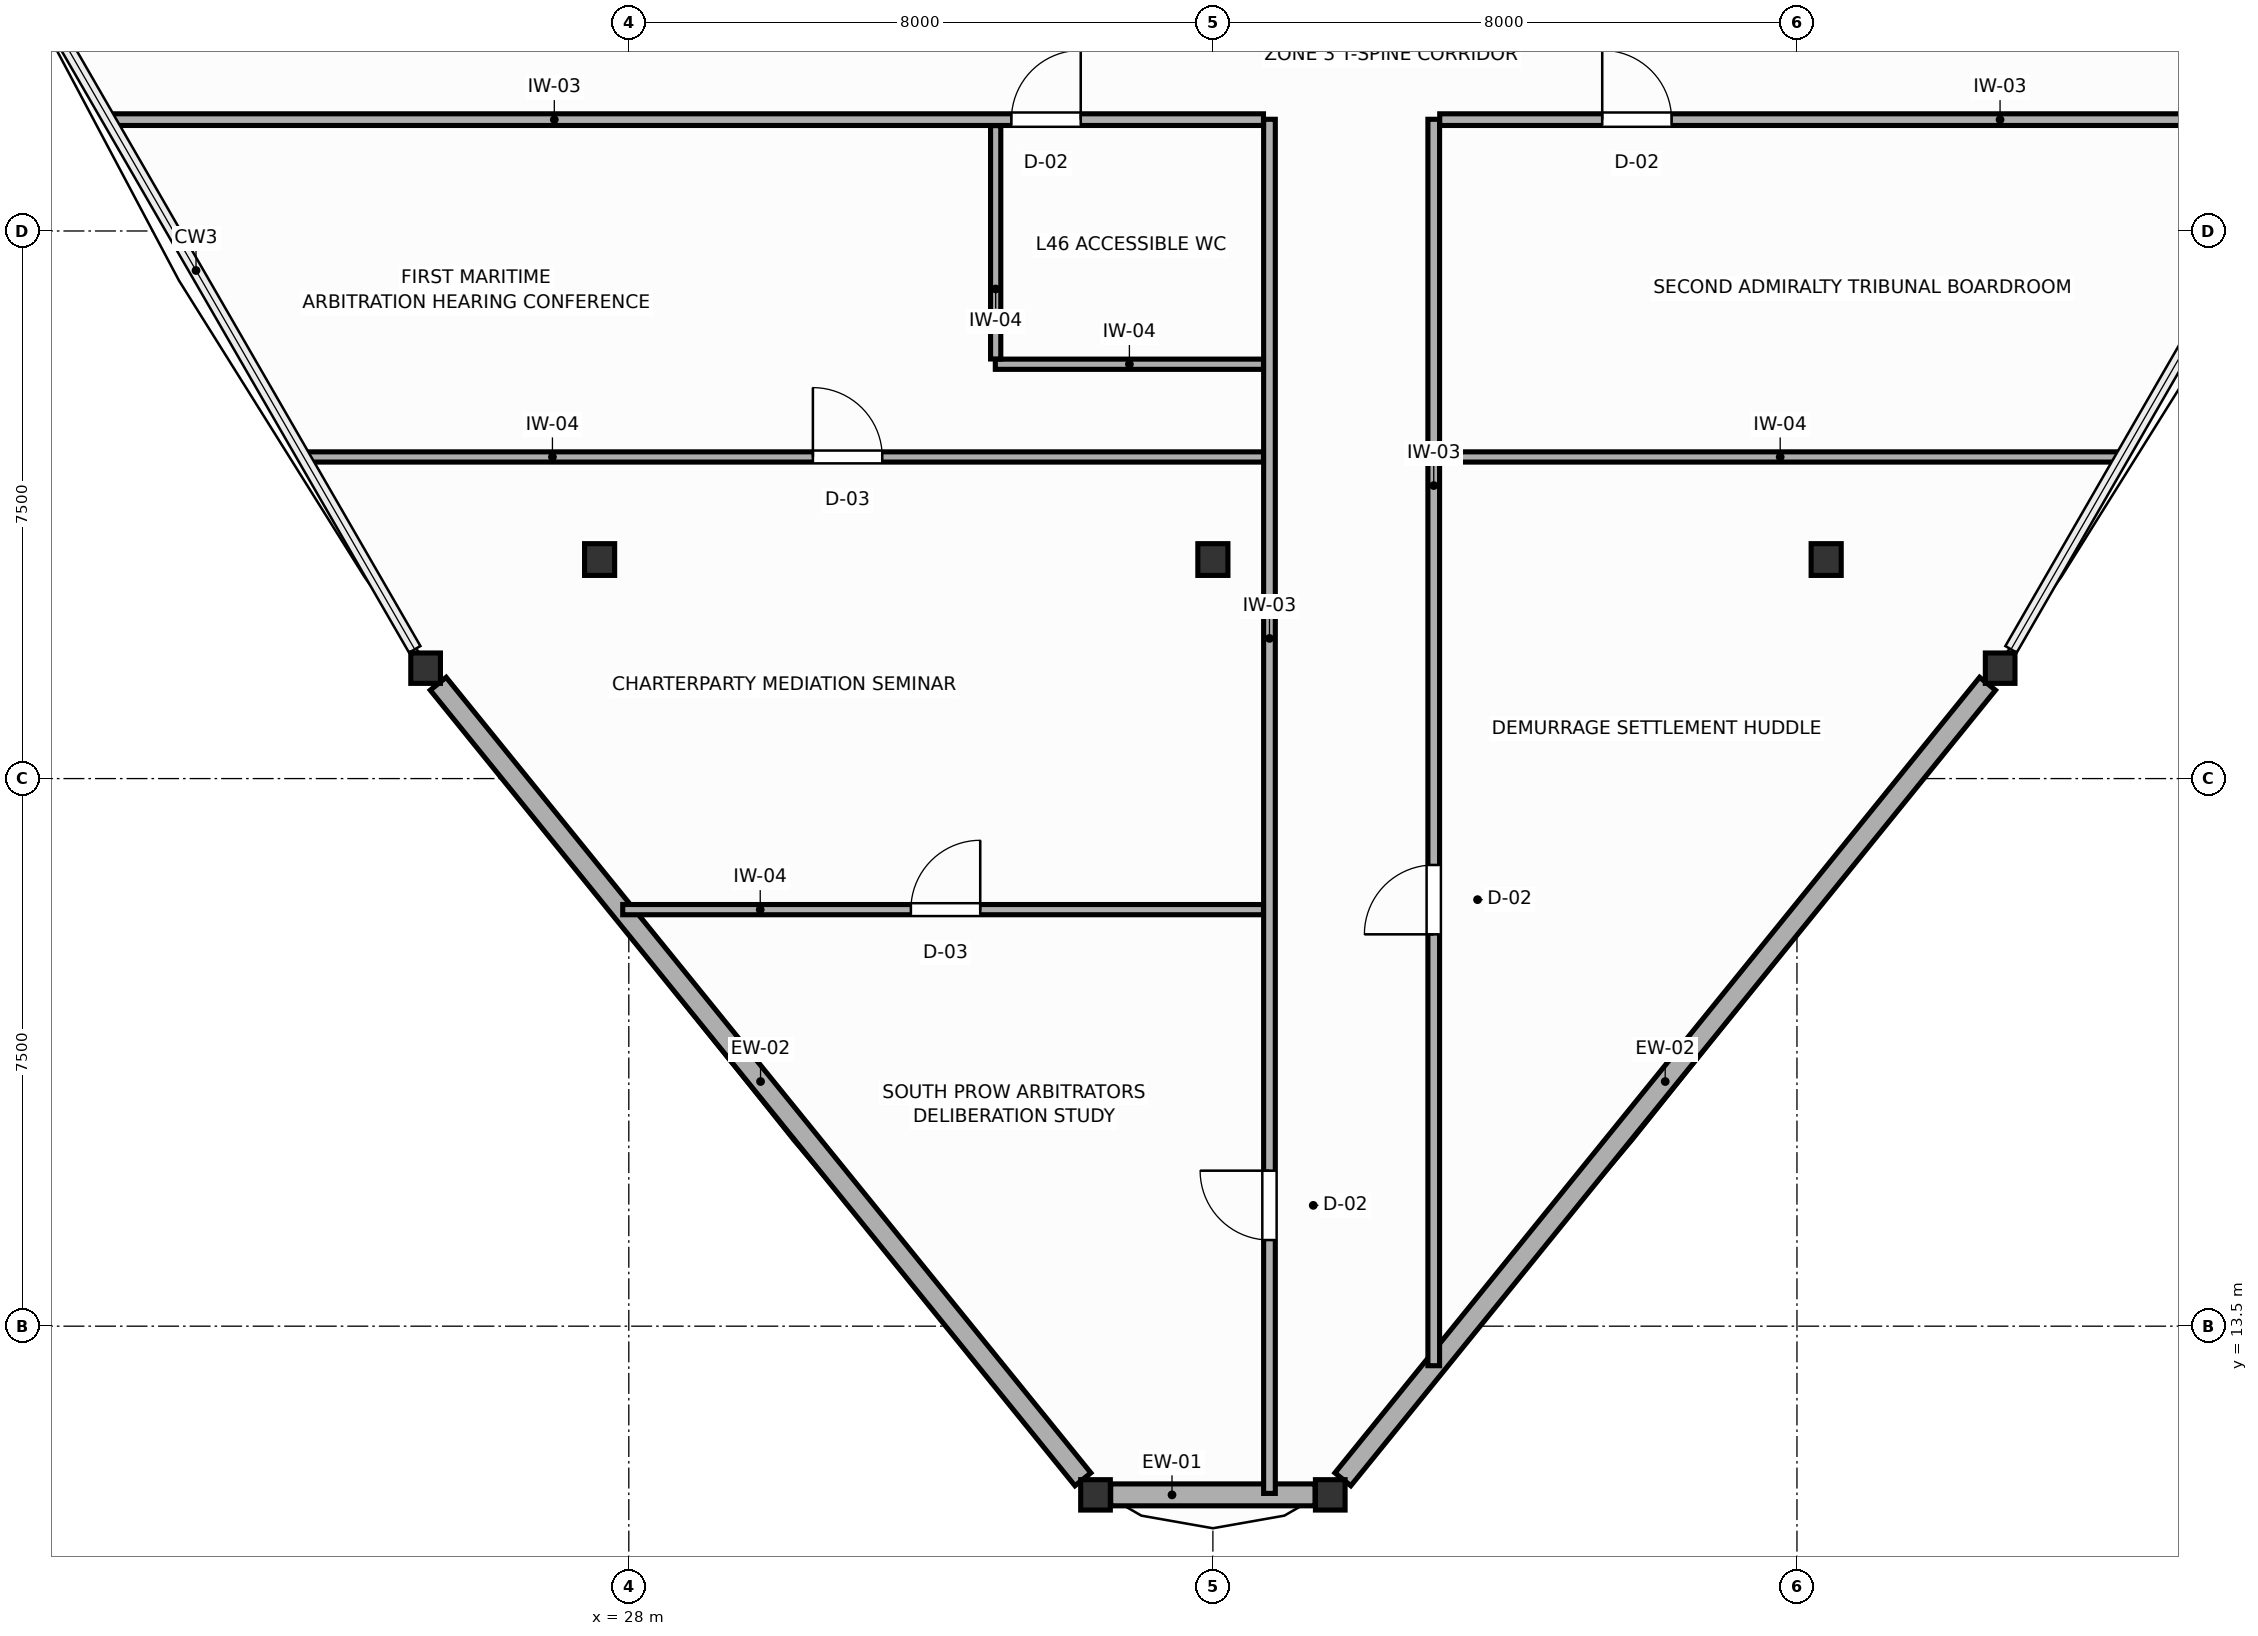
"""IFC4 building model, lengths in metres.
Left out: names, types, materials, properties, quantities, classifications, styles, units other than length and angle.
Written with IfcOpenShell. Run it as: python <this file> out.ifc"""

import sys

from ifc_helpers import new_model, si_unit, direction, frame, frame_2d, origin, origin_2d, place, context, subcontext, project, spatial, rectangle, i_section, extrude, source, transform, mapped, element, fill, save


model = new_model("IFC4")
c1 = context("Model", 3, precision=1e-05, world=origin(), true_north=direction((0.0, 1.0)))
c2 = subcontext(c1, "Body", "Model", "MODEL_VIEW")
j1 = project(units=[si_unit("LENGTHUNIT", "METRE"), si_unit("PLANEANGLEUNIT", "RADIAN")], contexts=[c1])
p1 = place(None, origin())
s1 = spatial("IfcSite", under=j1, at=p1, CompositionType="ELEMENT")
p2 = place(p1, origin())
s2 = spatial("IfcBuilding", under=s1, at=p2, CompositionType="ELEMENT")
p3 = place(p2, frame((0.0, 0.0, 179.4)))
s3 = spatial("IfcBuildingStorey", under=s2, at=p3, CompositionType="ELEMENT", Elevation=179.4)
m1 = source(origin(), c2, "Body", "SweptSolid", [
    extrude(i_section(OverallWidth=0.412, OverallDepth=0.435, WebThickness=0.033, FlangeThickness=0.053, FilletRadius=0.015, at=origin_2d()), origin(), (0.0, 0.0, 1.0), 3.6),
])
for number, where, z_axis, x_axis in (
    (1, (27.6, 24.0, 0.0), (0.0, 0.0, 1.0), (1.0, 0.0, 0.0)),
    (2, (44.4, 24.0, 0.0), (0.0, 0.0, 1.0), (1.0, 0.0, 0.0)),
    (3, (36.0, 24.0, 0.0), (0.0, 0.0, 1.0), (1.0, 0.0, 0.0)),
):
    element("IfcColumn", number, at=place(p3, frame(where, z_axis=z_axis, x_axis=x_axis)), inside=s3, PredefinedType="COLUMN", context=c2, shape_type="MappedRepresentation", body=[
        mapped(m1, transform((0.0, 0.0, 0.0), scale=1.0)),
    ])
m2 = source(origin(), c2, "Body", "SweptSolid", [
    extrude(i_section(OverallWidth=0.406, OverallDepth=0.416, WebThickness=0.027, FlangeThickness=0.044, FilletRadius=0.015, at=origin_2d()), origin(), (0.0, 0.0, 1.0), 3.6),
])
for number, where, z_axis, x_axis in (
    (4, (25.217, 22.512, 0.0), (0.0, 0.0, 1.0), (1.0, 0.0, 0.0)),
    (5, (34.392, 11.189, 0.0), (0.0, 0.0, 1.0), (1.0, 0.0, 0.0)),
    (6, (37.608, 11.189, 0.0), (0.0, 0.0, 1.0), (1.0, 0.0, 0.0)),
    (7, (46.783, 22.512, 0.0), (0.0, 0.0, 1.0), (1.0, 0.0, 0.0)),
):
    element("IfcColumn", number, at=place(p3, frame(where, z_axis=z_axis, x_axis=x_axis)), inside=s3, PredefinedType="COLUMN", context=c2, shape_type="MappedRepresentation", body=[
        mapped(m2, transform((0.0, 0.0, 0.0), scale=1.0)),
    ])
p4 = place(p3, frame((25.389, 22.299, 0.0), z_axis=(0.0, 0.0, 1.0), x_axis=(0.629601252026, -0.776918440666, 0.0)))
e8 = element("IfcWall", 8, at=p4, inside=s3, PredefinedType="SOLIDWALL", context=c2, shape_type="SweptSolid", body=[
    extrude(rectangle(XDim=14.025, YDim=0.28, at=frame_2d((7.013, 0.0))), origin(), (0.0, 0.0, 1.0), 1.87),
])
p5 = place(p3, frame((34.6, 11.189, 0.0), z_axis=(0.0, 0.0, 1.0), x_axis=(1.0, 0.0, 0.0)))
e9 = element("IfcWall", 9, at=p5, inside=s3, PredefinedType="SOLIDWALL", context=c2, shape_type="SweptSolid", body=[
    extrude(rectangle(XDim=2.799, YDim=0.3, at=frame_2d((1.4, 0.0))), origin(), (0.0, 0.0, 1.0), 1.87),
])
p6 = place(p3, frame((37.78, 11.403, 0.0), z_axis=(0.0, 0.0, 1.0), x_axis=(0.629601252026, 0.776918440666, 0.0)))
e10 = element("IfcWall", 10, at=p6, inside=s3, PredefinedType="SOLIDWALL", context=c2, shape_type="SweptSolid", body=[
    extrude(rectangle(XDim=14.025, YDim=0.28, at=frame_2d((7.013, 0.0))), origin(), (0.0, 0.0, 1.0), 1.87),
])
p7 = place(p3, frame((36.775, 11.209, 0.0), z_axis=(0.0, 0.0, 1.0), x_axis=(0.0, 1.0, 0.0)))
e11 = element("IfcWall", 11, at=p7, inside=s3, PredefinedType="PARTITIONING", context=c2, shape_type="SweptSolid", body=[
    extrude(rectangle(XDim=18.821, YDim=0.16, at=frame_2d((9.41, 0.0))), origin(), (0.0, 0.0, 1.0), 3.4),
])
p8 = place(p7, frame((3.47, 0.0, 0.0)))
e12 = element("IfcOpeningElement", 12, at=p8, cuts=e11, PredefinedType="OPENING", context=c2, shape_type="SweptSolid", body=[
    extrude(rectangle(XDim=0.95, YDim=2.05, at=frame_2d((0.475, 1.025))), frame((0.0, 0.09, 0.0), z_axis=(0.0, -1.0, 0.0), x_axis=(1.0, 0.0, 0.0)), (0.0, 0.0, 1.0), 0.18),
])
p9 = place(p3, frame((39.025, 12.958, 0.0), z_axis=(0.0, 0.0, 1.0), x_axis=(0.0, 1.0, 0.0)))
e13 = element("IfcWall", 13, at=p9, inside=s3, PredefinedType="PARTITIONING", context=c2, shape_type="SweptSolid", body=[
    extrude(rectangle(XDim=17.072, YDim=0.16, at=frame_2d((8.536, 0.0))), origin(), (0.0, 0.0, 1.0), 3.4),
])
p10 = place(p9, frame((5.908, 0.0, 0.0)))
e14 = element("IfcOpeningElement", 14, at=p10, cuts=e13, PredefinedType="OPENING", context=c2, shape_type="SweptSolid", body=[
    extrude(rectangle(XDim=0.95, YDim=2.05, at=frame_2d((0.475, 1.025))), frame((0.0, 0.09, 0.0), z_axis=(0.0, -1.0, 0.0), x_axis=(1.0, 0.0, 0.0)), (0.0, 0.0, 1.0), 0.18),
])
p11 = place(p3, frame((20.899, 30.025, 0.0), z_axis=(0.0, 0.0, 1.0), x_axis=(1.0, 0.0, 0.0)))
e15 = element("IfcWall", 15, at=p11, inside=s3, PredefinedType="PARTITIONING", context=c2, shape_type="SweptSolid", body=[
    extrude(rectangle(XDim=15.794, YDim=0.16, at=frame_2d((7.897, 0.0))), origin(), (0.0, 0.0, 1.0), 3.4),
])
p12 = place(p11, frame((12.341, 0.0, 0.0)))
e16 = element("IfcOpeningElement", 16, at=p12, cuts=e15, PredefinedType="OPENING", context=c2, shape_type="SweptSolid", body=[
    extrude(rectangle(XDim=0.95, YDim=2.05, at=frame_2d((0.475, 1.025))), frame((0.0, 0.09, 0.0), z_axis=(0.0, -1.0, 0.0), x_axis=(1.0, 0.0, 0.0)), (0.0, 0.0, 1.0), 0.18),
])
p13 = place(p3, frame((39.107, 30.025, 0.0), z_axis=(0.0, 0.0, 1.0), x_axis=(1.0, 0.0, 0.0)))
e17 = element("IfcWall", 17, at=p13, inside=s3, PredefinedType="PARTITIONING", context=c2, shape_type="SweptSolid", body=[
    extrude(rectangle(XDim=11.994, YDim=0.16, at=frame_2d((5.997, 0.0))), origin(), (0.0, 0.0, 1.0), 3.4),
])
p14 = place(p13, frame((2.226, 0.0, 0.0)))
e18 = element("IfcOpeningElement", 18, at=p14, cuts=e17, PredefinedType="OPENING", context=c2, shape_type="SweptSolid", body=[
    extrude(rectangle(XDim=0.95, YDim=2.05, at=frame_2d((0.475, 1.025))), frame((0.0, 0.09, 0.0), z_axis=(0.0, -1.0, 0.0), x_axis=(1.0, 0.0, 0.0)), (0.0, 0.0, 1.0), 0.18),
])
p15 = place(p3, frame((23.567, 25.405, 0.0), z_axis=(0.0, 0.0, 1.0), x_axis=(1.0, 0.0, 0.0)))
e19 = element("IfcWall", 19, at=p15, inside=s3, PredefinedType="PARTITIONING", context=c2, shape_type="SweptSolid", body=[
    extrude(rectangle(XDim=13.126, YDim=0.14, at=frame_2d((6.563, 0.0))), origin(), (0.0, 0.0, 1.0), 3.4),
])
p16 = place(p15, frame((6.955, 0.0, 0.0)))
e20 = element("IfcOpeningElement", 20, at=p16, cuts=e19, PredefinedType="OPENING", context=c2, shape_type="SweptSolid", body=[
    extrude(rectangle(XDim=0.95, YDim=2.05, at=frame_2d((0.475, 1.025))), frame((0.0, 0.08, 0.0), z_axis=(0.0, -1.0, 0.0), x_axis=(1.0, 0.0, 0.0)), (0.0, 0.0, 1.0), 0.16),
])
p17 = place(p3, frame((39.107, 25.405, 0.0), z_axis=(0.0, 0.0, 1.0), x_axis=(1.0, 0.0, 0.0)))
e21 = element("IfcWall", 21, at=p17, inside=s3, PredefinedType="PARTITIONING", context=c2, shape_type="SweptSolid", body=[
    extrude(rectangle(XDim=9.326, YDim=0.14, at=frame_2d((4.663, 0.0))), origin(), (0.0, 0.0, 1.0), 3.4),
])
p18 = place(p3, frame((27.917, 19.205, 0.0), z_axis=(0.0, 0.0, 1.0), x_axis=(1.0, 0.0, 0.0)))
e22 = element("IfcWall", 22, at=p18, inside=s3, PredefinedType="PARTITIONING", context=c2, shape_type="SweptSolid", body=[
    extrude(rectangle(XDim=8.776, YDim=0.14, at=frame_2d((4.388, 0.0))), origin(), (0.0, 0.0, 1.0), 3.4),
])
p19 = place(p18, frame((3.947, 0.0, 0.0)))
e23 = element("IfcOpeningElement", 23, at=p19, cuts=e22, PredefinedType="OPENING", context=c2, shape_type="SweptSolid", body=[
    extrude(rectangle(XDim=0.95, YDim=2.05, at=frame_2d((0.475, 1.025))), frame((0.0, 0.08, 0.0), z_axis=(0.0, -1.0, 0.0), x_axis=(1.0, 0.0, 0.0)), (0.0, 0.0, 1.0), 0.16),
])
p20 = place(p3, frame((33.02, 26.675, 0.0), z_axis=(0.0, 0.0, 1.0), x_axis=(1.0, 0.0, 0.0)))
e24 = element("IfcWall", 24, at=p20, inside=s3, PredefinedType="PARTITIONING", context=c2, shape_type="SweptSolid", body=[
    extrude(rectangle(XDim=3.673, YDim=0.14, at=frame_2d((1.836, 0.0))), origin(), (0.0, 0.0, 1.0), 3.4),
])
p21 = place(p3, frame((33.025, 26.747, 0.0), z_axis=(0.0, 0.0, 1.0), x_axis=(0.0, 1.0, 0.0)))
e25 = element("IfcWall", 25, at=p21, inside=s3, PredefinedType="PARTITIONING", context=c2, shape_type="SweptSolid", body=[
    extrude(rectangle(XDim=3.196, YDim=0.14, at=frame_2d((1.598, 0.0))), origin(), (0.0, 0.0, 1.0), 3.4),
])
p22 = place(p8, origin())
e26 = element("IfcDoor", 26, at=p22, inside=s3, OperationType="SINGLE_SWING_RIGHT", PredefinedType="DOOR", context=c2, shape_type="SweptSolid", body=[
    extrude(rectangle(XDim=0.95, YDim=2.05, at=frame_2d((0.475, 1.025))), frame((0.0, 0.025, 0.0), z_axis=(0.0, -1.0, 0.0), x_axis=(1.0, 0.0, 0.0)), (0.0, 0.0, 1.0), 0.05),
])
fill(e12, e26)
p23 = place(p10, origin())
e27 = element("IfcDoor", 27, at=p23, inside=s3, OperationType="SINGLE_SWING_LEFT", PredefinedType="DOOR", context=c2, shape_type="SweptSolid", body=[
    extrude(rectangle(XDim=0.95, YDim=2.05, at=frame_2d((0.475, 1.025))), frame((0.0, 0.025, 0.0), z_axis=(0.0, -1.0, 0.0), x_axis=(1.0, 0.0, 0.0)), (0.0, 0.0, 1.0), 0.05),
])
fill(e14, e27)
p24 = place(p12, origin())
e28 = element("IfcDoor", 28, at=p24, inside=s3, OperationType="SINGLE_SWING_RIGHT", PredefinedType="DOOR", context=c2, shape_type="SweptSolid", body=[
    extrude(rectangle(XDim=0.95, YDim=2.05, at=frame_2d((0.475, 1.025))), frame((0.0, 0.025, 0.0), z_axis=(0.0, -1.0, 0.0), x_axis=(1.0, 0.0, 0.0)), (0.0, 0.0, 1.0), 0.05),
])
fill(e16, e28)
p25 = place(p14, origin())
e29 = element("IfcDoor", 29, at=p25, inside=s3, OperationType="SINGLE_SWING_LEFT", PredefinedType="DOOR", context=c2, shape_type="SweptSolid", body=[
    extrude(rectangle(XDim=0.95, YDim=2.05, at=frame_2d((0.475, 1.025))), frame((0.0, 0.025, 0.0), z_axis=(0.0, -1.0, 0.0), x_axis=(1.0, 0.0, 0.0)), (0.0, 0.0, 1.0), 0.05),
])
fill(e18, e29)
p26 = place(p16, origin())
e30 = element("IfcDoor", 30, at=p26, inside=s3, OperationType="SINGLE_SWING_LEFT", PredefinedType="DOOR", context=c2, shape_type="SweptSolid", body=[
    extrude(rectangle(XDim=0.95, YDim=2.05, at=frame_2d((0.475, 1.025))), frame((0.0, 0.025, 0.0), z_axis=(0.0, -1.0, 0.0), x_axis=(1.0, 0.0, 0.0)), (0.0, 0.0, 1.0), 0.05),
])
fill(e20, e30)
p27 = place(p19, origin())
e31 = element("IfcDoor", 31, at=p27, inside=s3, OperationType="SINGLE_SWING_RIGHT", PredefinedType="DOOR", context=c2, shape_type="SweptSolid", body=[
    extrude(rectangle(XDim=0.95, YDim=2.05, at=frame_2d((0.475, 1.025))), frame((0.0, 0.025, 0.0), z_axis=(0.0, -1.0, 0.0), x_axis=(1.0, 0.0, 0.0)), (0.0, 0.0, 1.0), 0.05),
])
fill(e23, e31)
save(model, sys.argv[1])
